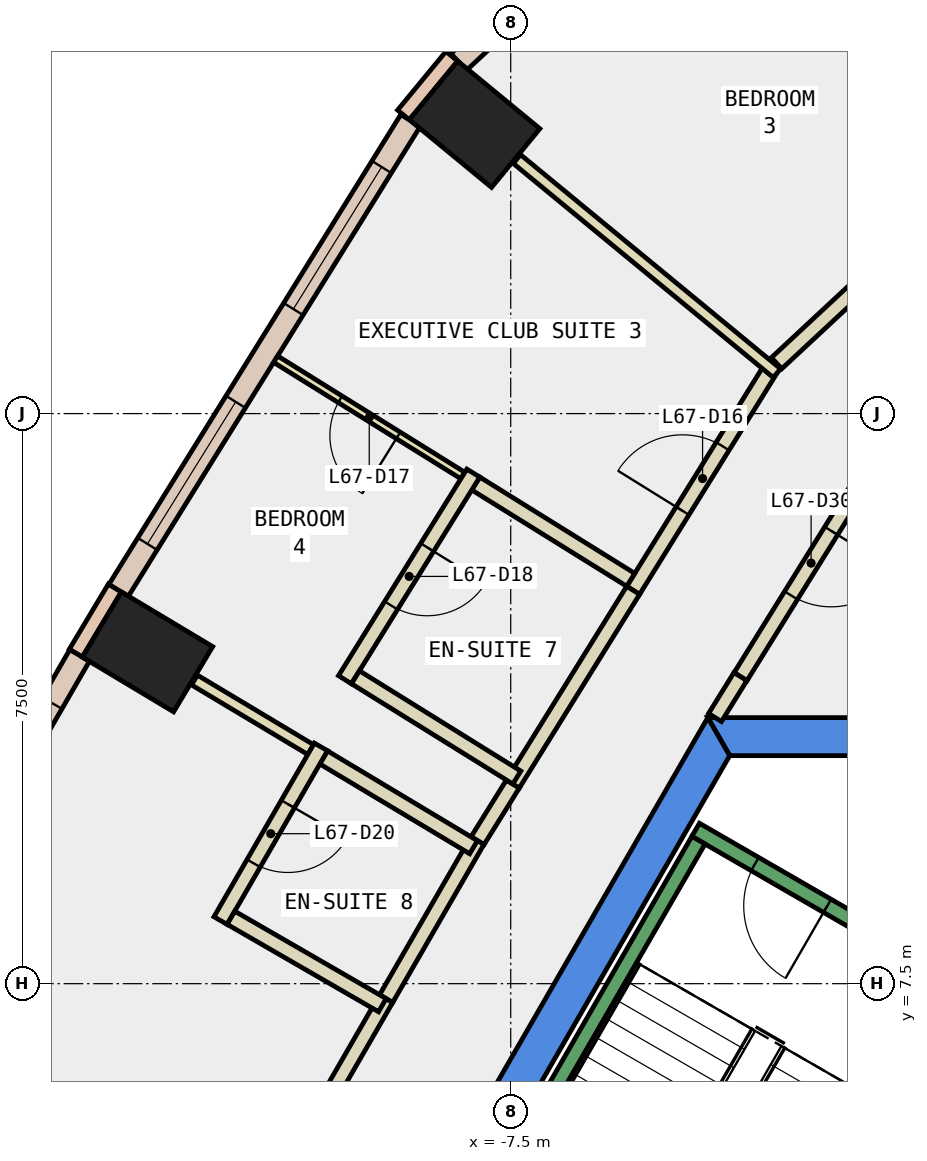
"""IFC4 building model, lengths in metres.
Left out: names, types, materials, properties, quantities, classifications, styles, units other than length and angle.
Written with IfcOpenShell. Run it as: python <this file> out.ifc"""

import sys

from ifc_helpers import new_model, si_unit, direction, frame, frame_2d, origin, origin_2d, place, context, subcontext, project, spatial, polyline, rectangle, outline, extrude, element, fill, save


model = new_model("IFC4")
c1 = context("Model", 3, precision=1e-05, world=origin(), true_north=direction((0.0, 1.0)))
c2 = subcontext(c1, "Body", "Model", "MODEL_VIEW")
j1 = project(units=[si_unit("LENGTHUNIT", "METRE"), si_unit("PLANEANGLEUNIT", "RADIAN")], contexts=[c1])
p1 = place(None, origin())
s1 = spatial("IfcSite", under=j1, at=p1, CompositionType="ELEMENT")
p2 = place(p1, origin())
s2 = spatial("IfcBuilding", under=s1, at=p2, CompositionType="ELEMENT")
p3 = place(p2, frame((0.0, 0.0, 290.0)))
s3 = spatial("IfcBuildingStorey", under=s2, at=p3, CompositionType="ELEMENT", Elevation=290.0)
for number, where, z_axis, x_axis in (
    (1, (-7.975, 18.807, -0.34), (0.0, 0.0, 1.0), (0.636, 0.772, 0.0)),
    (2, (-12.279, 11.865, -0.34), (0.0, 0.0, 1.0), (0.514, 0.858, 0.0)),
):
    element("IfcColumn", number, at=place(p3, frame(where, z_axis=z_axis, x_axis=x_axis)), inside=s3, PredefinedType="COLUMN", context=c2, shape_type="SweptSolid", body=[
        extrude(rectangle(XDim=1.0, YDim=1.4, at=origin_2d()), origin(), (0.0, 0.0, 1.0), 3.6),
    ])
p4 = place(p3, frame((0.0, 0.0, -0.34)))
e3 = element("IfcWall", 3, at=p4, inside=s3, PredefinedType="SHEAR", context=c2, shape_type="SweptSolid", body=[
    extrude(outline(polyline([(4.907, 11.0), (-4.907, 11.0), (-4.619, 10.5), (4.619, 10.5), (4.907, 11.0)])), origin(), (0.0, 0.0, 1.0), 3.6),
])
p5 = place(p3, frame((0.0, 0.0, -0.34)))
e4 = element("IfcWall", 4, at=p5, inside=s3, PredefinedType="SHEAR", context=c2, shape_type="SweptSolid", body=[
    extrude(outline(polyline([(-9.236, 3.502), (-8.803, 3.253), (-4.619, 10.5), (-4.907, 11.0), (-9.236, 3.502)])), origin(), (0.0, 0.0, 1.0), 3.6),
])
for number, where, z_axis, x_axis in (
    (5, (-8.275, 19.701, 0.0), (0.0, 0.0, 1.0), (-0.636, -0.772, 0.0)),
    (6, (-12.708, 12.706, 0.0), (0.0, 0.0, 1.0), (-0.514, -0.858, 0.0)),
):
    element("IfcWall", number, at=place(p3, frame(where, z_axis=z_axis, x_axis=x_axis)), inside=s3, PredefinedType="STANDARD", context=c2, shape_type="SweptSolid", body=[
        extrude(rectangle(XDim=1.0, YDim=0.2, at=frame_2d((0.5, 0.0))), origin(), (0.0, 0.0, 1.0), 3.26),
    ])
p6 = place(p3, frame((-5.241, 22.362, 0.0), z_axis=(0.0, 0.0, 1.0), x_axis=(-0.732397380344, -0.680877431896, 0.0)))
e7 = element("IfcWall", 7, at=p6, inside=s3, PredefinedType="STANDARD", context=c2, shape_type="SweptSolid", body=[
    extrude(rectangle(XDim=4.019, YDim=0.3, at=frame_2d((2.009, 0.0))), origin(), (0.0, 0.0, 1.0), 3.26),
])
p7 = place(p6, frame((1.309, 0.0, 0.9)))
e8 = element("IfcOpeningElement", 8, at=p7, cuts=e7, PredefinedType="OPENING", context=c2, shape_type="SweptSolid", body=[
    extrude(rectangle(XDim=1.4, YDim=2.0, at=frame_2d((0.7, 1.0))), frame((0.0, 0.16, 0.0), z_axis=(0.0, -1.0, 0.0), x_axis=(1.0, 0.0, 0.0)), (0.0, 0.0, 1.0), 0.32),
])
p8 = place(p3, frame((-8.819, 18.855, 0.0), z_axis=(0.0, 0.0, 1.0), x_axis=(-0.527762071678, -0.849392250788, 0.0)))
e9 = element("IfcWall", 9, at=p8, inside=s3, PredefinedType="STANDARD", context=c2, shape_type="SweptSolid", body=[
    extrude(rectangle(XDim=7.276, YDim=0.3, at=frame_2d((3.638, 0.0))), origin(), (0.0, 0.0, 1.0), 3.26),
])
p9 = place(p8, frame((0.719, 0.0, 0.9)))
e10 = element("IfcOpeningElement", 10, at=p9, cuts=e9, PredefinedType="OPENING", context=c2, shape_type="SweptSolid", body=[
    extrude(rectangle(XDim=2.2, YDim=2.0, at=frame_2d((1.1, 1.0))), frame((0.0, 0.16, 0.0), z_axis=(0.0, -1.0, 0.0), x_axis=(1.0, 0.0, 0.0)), (0.0, 0.0, 1.0), 0.32),
])
p10 = place(p8, frame((4.357, 0.0, 0.9)))
e11 = element("IfcOpeningElement", 11, at=p10, cuts=e9, PredefinedType="OPENING", context=c2, shape_type="SweptSolid", body=[
    extrude(rectangle(XDim=2.2, YDim=2.0, at=frame_2d((1.1, 1.0))), frame((0.0, 0.16, 0.0), z_axis=(0.0, -1.0, 0.0), x_axis=(1.0, 0.0, 0.0)), (0.0, 0.0, 1.0), 0.32),
])
p11 = place(p3, frame((-13.172, 11.819, 0.0), z_axis=(0.0, 0.0, 1.0), x_axis=(-0.499945412946, -0.866056917341, 0.0)))
e12 = element("IfcWall", 12, at=p11, inside=s3, PredefinedType="STANDARD", context=c2, shape_type="SweptSolid", body=[
    extrude(rectangle(XDim=7.299, YDim=0.3, at=frame_2d((3.649, 0.0))), origin(), (0.0, 0.0, 1.0), 3.26),
])
p12 = place(p11, frame((0.725, 0.0, 0.9)))
e13 = element("IfcOpeningElement", 13, at=p12, cuts=e12, PredefinedType="OPENING", context=c2, shape_type="SweptSolid", body=[
    extrude(rectangle(XDim=2.2, YDim=2.0, at=frame_2d((1.1, 1.0))), frame((0.0, 0.16, 0.0), z_axis=(0.0, -1.0, 0.0), x_axis=(1.0, 0.0, 0.0)), (0.0, 0.0, 1.0), 0.32),
])
p13 = place(p11, frame((4.374, 0.0, 0.9)))
e14 = element("IfcOpeningElement", 14, at=p13, cuts=e12, PredefinedType="OPENING", context=c2, shape_type="SweptSolid", body=[
    extrude(rectangle(XDim=2.2, YDim=2.0, at=frame_2d((1.1, 1.0))), frame((0.0, 0.16, 0.0), z_axis=(0.0, -1.0, 0.0), x_axis=(1.0, 0.0, 0.0)), (0.0, 0.0, 1.0), 0.32),
])
p14 = place(p3, frame((-2.62, 14.526, 0.0), z_axis=(0.0, 0.0, 1.0), x_axis=(-0.527787942423, -0.849376175692, 0.0)))
e15 = element("IfcWall", 15, at=p14, inside=s3, PredefinedType="PARTITIONING", context=c2, shape_type="SweptSolid", body=[
    extrude(rectangle(XDim=3.517, YDim=0.2, at=frame_2d((1.758, 0.0))), origin(), (0.0, 0.0, 1.0), 3.26),
])
p15 = place(p14, frame((1.258, 0.0, 0.0)))
e16 = element("IfcOpeningElement", 16, at=p15, cuts=e15, PredefinedType="OPENING", context=c2, shape_type="SweptSolid", body=[
    extrude(rectangle(XDim=1.0, YDim=2.1, at=frame_2d((0.5, 1.05))), frame((0.0, 0.11, 0.0), z_axis=(0.0, -1.0, 0.0), x_axis=(1.0, 0.0, 0.0)), (0.0, 0.0, 1.0), 0.22),
])
p16 = place(p3, frame((-4.478, 11.54, 0.0), z_axis=(0.0, 0.0, 1.0), x_axis=(-0.527362861778, -0.849640166198, 0.0)))
e17 = element("IfcWall", 17, at=p16, inside=s3, PredefinedType="PARTITIONING", context=c2, shape_type="SweptSolid", body=[
    extrude(rectangle(XDim=0.633, YDim=0.2, at=frame_2d((0.317, 0.0))), origin(), (0.0, 0.0, 1.0), 3.26),
])
p17 = place(p3, frame((-4.002, 15.663, 0.0), z_axis=(0.0, 0.0, 1.0), x_axis=(0.732331154554, 0.680948661846, 0.0)))
e18 = element("IfcWall", 18, at=p17, inside=s3, PredefinedType="PARTITIONING", context=c2, shape_type="SweptSolid", body=[
    extrude(rectangle(XDim=2.803, YDim=0.2, at=frame_2d((1.402, 0.0))), origin(), (0.0, 0.0, 1.0), 3.26),
])
p18 = place(p3, frame((-5.889, 12.675, 0.0), z_axis=(0.0, 0.0, 1.0), x_axis=(0.527550626699, 0.849523593709, 0.0)))
e19 = element("IfcWall", 19, at=p18, inside=s3, PredefinedType="PARTITIONING", context=c2, shape_type="SweptSolid", body=[
    extrude(rectangle(XDim=3.463, YDim=0.2, at=frame_2d((1.731, 0.0))), origin(), (0.0, 0.0, 1.0), 3.26),
])
p19 = place(p18, frame((1.231, 0.0, 0.0)))
e20 = element("IfcOpeningElement", 20, at=p19, cuts=e19, PredefinedType="OPENING", context=c2, shape_type="SweptSolid", body=[
    extrude(rectangle(XDim=1.0, YDim=2.1, at=frame_2d((0.5, 1.05))), frame((0.0, 0.11, 0.0), z_axis=(0.0, -1.0, 0.0), x_axis=(1.0, 0.0, 0.0)), (0.0, 0.0, 1.0), 0.22),
])
p20 = place(p3, frame((-7.937, 9.38, 0.0), z_axis=(0.0, 0.0, 1.0), x_axis=(0.52850186976, 0.848932137252, 0.0)))
e21 = element("IfcWall", 21, at=p20, inside=s3, PredefinedType="PARTITIONING", context=c2, shape_type="SweptSolid", body=[
    extrude(rectangle(XDim=0.88, YDim=0.2, at=frame_2d((0.44, 0.0))), origin(), (0.0, 0.0, 1.0), 3.26),
])
p21 = place(p3, frame((-7.472, 10.127, 0.0), z_axis=(0.0, 0.0, 1.0), x_axis=(0.527707224705, 0.849426326996, 0.0)))
e22 = element("IfcWall", 22, at=p21, inside=s3, PredefinedType="PARTITIONING", context=c2, shape_type="SweptSolid", body=[
    extrude(rectangle(XDim=3.0, YDim=0.2, at=frame_2d((1.5, 0.0))), origin(), (0.0, 0.0, 1.0), 3.26),
])
p22 = place(p3, frame((-12.082, 2.207, 0.0), z_axis=(0.0, 0.0, 1.0), x_axis=(0.500123454404, 0.865954115618, 0.0)))
e23 = element("IfcWall", 23, at=p22, inside=s3, PredefinedType="PARTITIONING", context=c2, shape_type="SweptSolid", body=[
    extrude(rectangle(XDim=5.885, YDim=0.2, at=frame_2d((2.942, 0.0))), origin(), (0.0, 0.0, 1.0), 3.26),
])
p23 = place(p22, frame((2.493, 0.0, 0.0)))
e24 = element("IfcOpeningElement", 24, at=p23, cuts=e23, PredefinedType="OPENING", context=c2, shape_type="SweptSolid", body=[
    extrude(rectangle(XDim=1.0, YDim=2.1, at=frame_2d((0.5, 1.05))), frame((0.0, 0.11, 0.0), z_axis=(0.0, -1.0, 0.0), x_axis=(1.0, 0.0, 0.0)), (0.0, 0.0, 1.0), 0.22),
])
p24 = place(p3, frame((-9.139, 7.303, 0.0), z_axis=(0.0, 0.0, 1.0), x_axis=(0.499869187296, 0.866100915363, 0.0)))
e25 = element("IfcWall", 25, at=p24, inside=s3, PredefinedType="PARTITIONING", context=c2, shape_type="SweptSolid", body=[
    extrude(rectangle(XDim=2.401, YDim=0.2, at=frame_2d((1.2, 0.0))), origin(), (0.0, 0.0, 1.0), 3.26),
])
p25 = place(p3, frame((-3.998, 15.532, 0.0), z_axis=(0.0, 0.0, 1.0), x_axis=(-0.771938186867, 0.635697597649, 0.0)))
e26 = element("IfcWall", 26, at=p25, inside=s3, PredefinedType="PARTITIONING", context=c2, shape_type="SweptSolid", body=[
    extrude(rectangle(XDim=4.432, YDim=0.15, at=frame_2d((2.216, 0.0))), origin(), (0.0, 0.0, 1.0), 3.26),
])
p26 = place(p3, frame((-8.13, 14.185, 0.0), z_axis=(0.0, 0.0, 1.0), x_axis=(-0.849305726881, 0.527901299759, 0.0)))
e27 = element("IfcWall", 27, at=p26, inside=s3, PredefinedType="PARTITIONING", context=c2, shape_type="SweptSolid", body=[
    extrude(rectangle(XDim=2.9, YDim=0.1, at=frame_2d((1.45, 0.0))), origin(), (0.0, 0.0, 1.0), 3.26),
])
p27 = place(p26, frame((1.0, 0.0, 0.0)))
e28 = element("IfcOpeningElement", 28, at=p27, cuts=e27, PredefinedType="OPENING", context=c2, shape_type="SweptSolid", body=[
    extrude(rectangle(XDim=0.9, YDim=2.1, at=frame_2d((0.45, 1.05))), frame((0.0, 0.06, 0.0), z_axis=(0.0, -1.0, 0.0), x_axis=(1.0, 0.0, 0.0)), (0.0, 0.0, 1.0), 0.12),
])
p28 = place(p3, frame((-5.921, 12.813, 0.0), z_axis=(0.0, 0.0, 1.0), x_axis=(-0.849366650736, 0.527803270752, 0.0)))
e29 = element("IfcWall", 29, at=p28, inside=s3, PredefinedType="PARTITIONING", context=c2, shape_type="SweptSolid", body=[
    extrude(rectangle(XDim=2.401, YDim=0.2, at=frame_2d((1.2, 0.0))), origin(), (0.0, 0.0, 1.0), 3.26),
])
p29 = place(p3, frame((-7.992, 14.217, 0.0), z_axis=(0.0, 0.0, 1.0), x_axis=(-0.527795797674, -0.849371294522, 0.0)))
e30 = element("IfcWall", 30, at=p29, inside=s3, PredefinedType="PARTITIONING", context=c2, shape_type="SweptSolid", body=[
    extrude(rectangle(XDim=3.2, YDim=0.2, at=frame_2d((1.6, 0.0))), origin(), (0.0, 0.0, 1.0), 3.26),
])
p30 = place(p29, frame((1.15, 0.0, 0.0)))
e31 = element("IfcOpeningElement", 31, at=p30, cuts=e30, PredefinedType="OPENING", context=c2, shape_type="SweptSolid", body=[
    extrude(rectangle(XDim=0.9, YDim=2.1, at=frame_2d((0.45, 1.05))), frame((0.0, 0.11, 0.0), z_axis=(0.0, -1.0, 0.0), x_axis=(1.0, 0.0, 0.0)), (0.0, 0.0, 1.0), 0.22),
])
p31 = place(p3, frame((-9.543, 11.531, 0.0), z_axis=(0.0, 0.0, 1.0), x_axis=(0.849400119549, -0.527749407305, 0.0)))
e32 = element("IfcWall", 32, at=p31, inside=s3, PredefinedType="PARTITIONING", context=c2, shape_type="SweptSolid", body=[
    extrude(rectangle(XDim=2.5, YDim=0.2, at=frame_2d((1.25, 0.0))), origin(), (0.0, 0.0, 1.0), 3.26),
])
p32 = place(p3, frame((-10.133, 10.58, 0.0), z_axis=(0.0, 0.0, 1.0), x_axis=(-0.857903919212, 0.513810145287, 0.0)))
e33 = element("IfcWall", 33, at=p32, inside=s3, PredefinedType="PARTITIONING", context=c2, shape_type="SweptSolid", body=[
    extrude(rectangle(XDim=1.781, YDim=0.15, at=frame_2d((0.891, 0.0))), origin(), (0.0, 0.0, 1.0), 3.26),
])
p33 = place(p3, frame((-7.989, 9.295, 0.0), z_axis=(0.0, 0.0, 1.0), x_axis=(-0.857801856135, 0.513980520654, 0.0)))
e34 = element("IfcWall", 34, at=p33, inside=s3, PredefinedType="PARTITIONING", context=c2, shape_type="SweptSolid", body=[
    extrude(rectangle(XDim=2.3, YDim=0.2, at=frame_2d((1.15, 0.0))), origin(), (0.0, 0.0, 1.0), 3.26),
])
p34 = place(p3, frame((-9.997, 10.615, 0.0), z_axis=(0.0, 0.0, 1.0), x_axis=(-0.500525697837, -0.865721679182, 0.0)))
e35 = element("IfcWall", 35, at=p34, inside=s3, PredefinedType="PARTITIONING", context=c2, shape_type="SweptSolid", body=[
    extrude(rectangle(XDim=2.639, YDim=0.2, at=frame_2d((1.32, 0.0))), origin(), (0.0, 0.0, 1.0), 3.26),
])
p35 = place(p34, frame((0.869, 0.0, 0.0)))
e36 = element("IfcOpeningElement", 36, at=p35, cuts=e35, PredefinedType="OPENING", context=c2, shape_type="SweptSolid", body=[
    extrude(rectangle(XDim=0.9, YDim=2.1, at=frame_2d((0.45, 1.05))), frame((0.0, 0.11, 0.0), z_axis=(0.0, -1.0, 0.0), x_axis=(1.0, 0.0, 0.0)), (0.0, 0.0, 1.0), 0.22),
])
p36 = place(p3, frame((-11.181, 8.367, 0.0), z_axis=(0.0, 0.0, 1.0), x_axis=(0.866053019151, -0.499952165731, 0.0)))
e37 = element("IfcWall", 37, at=p36, inside=s3, PredefinedType="PARTITIONING", context=c2, shape_type="SweptSolid", body=[
    extrude(rectangle(XDim=2.3, YDim=0.2, at=frame_2d((1.15, 0.0))), origin(), (0.0, 0.0, 1.0), 3.26),
])
p37 = place(p3, frame((-1.256, 7.324, 0.0), z_axis=(0.0, 0.0, 1.0), x_axis=(-0.866046073146, 0.499964197906, 0.0)))
e38 = element("IfcWall", 38, at=p37, inside=s3, PredefinedType="STANDARD", context=c2, shape_type="SweptSolid", body=[
    extrude(rectangle(XDim=4.4, YDim=0.2, at=frame_2d((2.2, 0.0))), origin(), (0.0, 0.0, 1.0), 3.26),
])
p38 = place(p37, frame((2.4, 0.0, 0.0)))
e39 = element("IfcOpeningElement", 39, at=p38, cuts=e38, PredefinedType="OPENING", context=c2, shape_type="SweptSolid", body=[
    extrude(rectangle(XDim=1.1, YDim=2.2, at=frame_2d((0.55, 1.1))), frame((0.0, 0.11, 0.0), z_axis=(0.0, -1.0, 0.0), x_axis=(1.0, 0.0, 0.0)), (0.0, 0.0, 1.0), 0.22),
])
p39 = place(p3, frame((-1.393, 7.288, 0.0), z_axis=(0.0, 0.0, 1.0), x_axis=(-0.499963383562, -0.866046543262, 0.0)))
e40 = element("IfcWall", 40, at=p39, inside=s3, PredefinedType="STANDARD", context=c2, shape_type="SweptSolid", body=[
    extrude(rectangle(XDim=6.9, YDim=0.2, at=frame_2d((3.45, 0.0))), origin(), (0.0, 0.0, 1.0), 3.26),
])
p40 = place(p39, frame((0.45, 0.0, 0.0)))
e41 = element("IfcOpeningElement", 41, at=p40, cuts=e40, PredefinedType="OPENING", context=c2, shape_type="SweptSolid", body=[
    extrude(rectangle(XDim=1.1, YDim=2.2, at=frame_2d((0.55, 1.1))), frame((0.0, 0.11, 0.0), z_axis=(0.0, -1.0, 0.0), x_axis=(1.0, 0.0, 0.0)), (0.0, 0.0, 1.0), 0.22),
])
p41 = place(p3, frame((-5.03, 9.388, 0.0), z_axis=(0.0, 0.0, 1.0), x_axis=(-0.499978703459, -0.866037698999, 0.0)))
e42 = element("IfcWall", 42, at=p41, inside=s3, PredefinedType="STANDARD", context=c2, shape_type="SweptSolid", body=[
    extrude(rectangle(XDim=6.9, YDim=0.2, at=frame_2d((3.45, 0.0))), origin(), (0.0, 0.0, 1.0), 3.26),
])
p42 = place(p9, origin())
e43 = element("IfcWindow", 43, at=p42, inside=s3, PartitioningType="SINGLE_PANEL", PredefinedType="WINDOW", context=c2, shape_type="SweptSolid", body=[
    extrude(rectangle(XDim=2.2, YDim=2.0, at=frame_2d((1.1, 1.0))), frame((0.0, 0.03, 0.0), z_axis=(0.0, -1.0, 0.0), x_axis=(1.0, 0.0, 0.0)), (0.0, 0.0, 1.0), 0.06),
])
fill(e10, e43)
p43 = place(p10, origin())
e44 = element("IfcWindow", 44, at=p43, inside=s3, PartitioningType="SINGLE_PANEL", PredefinedType="WINDOW", context=c2, shape_type="SweptSolid", body=[
    extrude(rectangle(XDim=2.2, YDim=2.0, at=frame_2d((1.1, 1.0))), frame((0.0, 0.03, 0.0), z_axis=(0.0, -1.0, 0.0), x_axis=(1.0, 0.0, 0.0)), (0.0, 0.0, 1.0), 0.06),
])
fill(e11, e44)
p44 = place(p12, origin())
e45 = element("IfcWindow", 45, at=p44, inside=s3, PartitioningType="SINGLE_PANEL", PredefinedType="WINDOW", context=c2, shape_type="SweptSolid", body=[
    extrude(rectangle(XDim=2.2, YDim=2.0, at=frame_2d((1.1, 1.0))), frame((0.0, 0.03, 0.0), z_axis=(0.0, -1.0, 0.0), x_axis=(1.0, 0.0, 0.0)), (0.0, 0.0, 1.0), 0.06),
])
fill(e13, e45)
p45 = place(p19, origin())
e46 = element("IfcDoor", 46, at=p45, inside=s3, OperationType="SINGLE_SWING_LEFT", PredefinedType="DOOR", context=c2, shape_type="SweptSolid", body=[
    extrude(rectangle(XDim=1.0, YDim=2.1, at=frame_2d((0.5, 1.05))), frame((0.0, 0.025, 0.0), z_axis=(0.0, -1.0, 0.0), x_axis=(1.0, 0.0, 0.0)), (0.0, 0.0, 1.0), 0.05),
])
fill(e20, e46)
p46 = place(p27, origin())
e47 = element("IfcDoor", 47, at=p46, inside=s3, OperationType="SINGLE_SWING_LEFT", PredefinedType="DOOR", context=c2, shape_type="SweptSolid", body=[
    extrude(rectangle(XDim=0.9, YDim=2.1, at=frame_2d((0.45, 1.05))), frame((0.0, 0.025, 0.0), z_axis=(0.0, -1.0, 0.0), x_axis=(1.0, 0.0, 0.0)), (0.0, 0.0, 1.0), 0.05),
])
fill(e28, e47)
p47 = place(p30, origin())
e48 = element("IfcDoor", 48, at=p47, inside=s3, OperationType="SINGLE_SWING_LEFT", PredefinedType="DOOR", context=c2, shape_type="SweptSolid", body=[
    extrude(rectangle(XDim=0.9, YDim=2.1, at=frame_2d((0.45, 1.05))), frame((0.0, 0.025, 0.0), z_axis=(0.0, -1.0, 0.0), x_axis=(1.0, 0.0, 0.0)), (0.0, 0.0, 1.0), 0.05),
])
fill(e31, e48)
p48 = place(p35, origin())
e49 = element("IfcDoor", 49, at=p48, inside=s3, OperationType="SINGLE_SWING_LEFT", PredefinedType="DOOR", context=c2, shape_type="SweptSolid", body=[
    extrude(rectangle(XDim=0.9, YDim=2.1, at=frame_2d((0.45, 1.05))), frame((0.0, 0.025, 0.0), z_axis=(0.0, -1.0, 0.0), x_axis=(1.0, 0.0, 0.0)), (0.0, 0.0, 1.0), 0.05),
])
fill(e36, e49)
p49 = place(p15, origin())
e50 = element("IfcDoor", 50, at=p49, inside=s3, OperationType="SINGLE_SWING_RIGHT", PredefinedType="DOOR", context=c2, shape_type="SweptSolid", body=[
    extrude(rectangle(XDim=1.0, YDim=2.1, at=frame_2d((0.5, 1.05))), frame((0.0, 0.025, 0.0), z_axis=(0.0, -1.0, 0.0), x_axis=(1.0, 0.0, 0.0)), (0.0, 0.0, 1.0), 0.05),
])
fill(e16, e50)
p50 = place(p38, origin())
e51 = element("IfcDoor", 51, at=p50, inside=s3, OperationType="SINGLE_SWING_LEFT", PredefinedType="DOOR", context=c2, shape_type="SweptSolid", body=[
    extrude(rectangle(XDim=1.1, YDim=2.2, at=frame_2d((0.55, 1.1))), frame((0.0, 0.025, 0.0), z_axis=(0.0, -1.0, 0.0), x_axis=(1.0, 0.0, 0.0)), (0.0, 0.0, 1.0), 0.05),
])
fill(e39, e51)
save(model, sys.argv[1])
